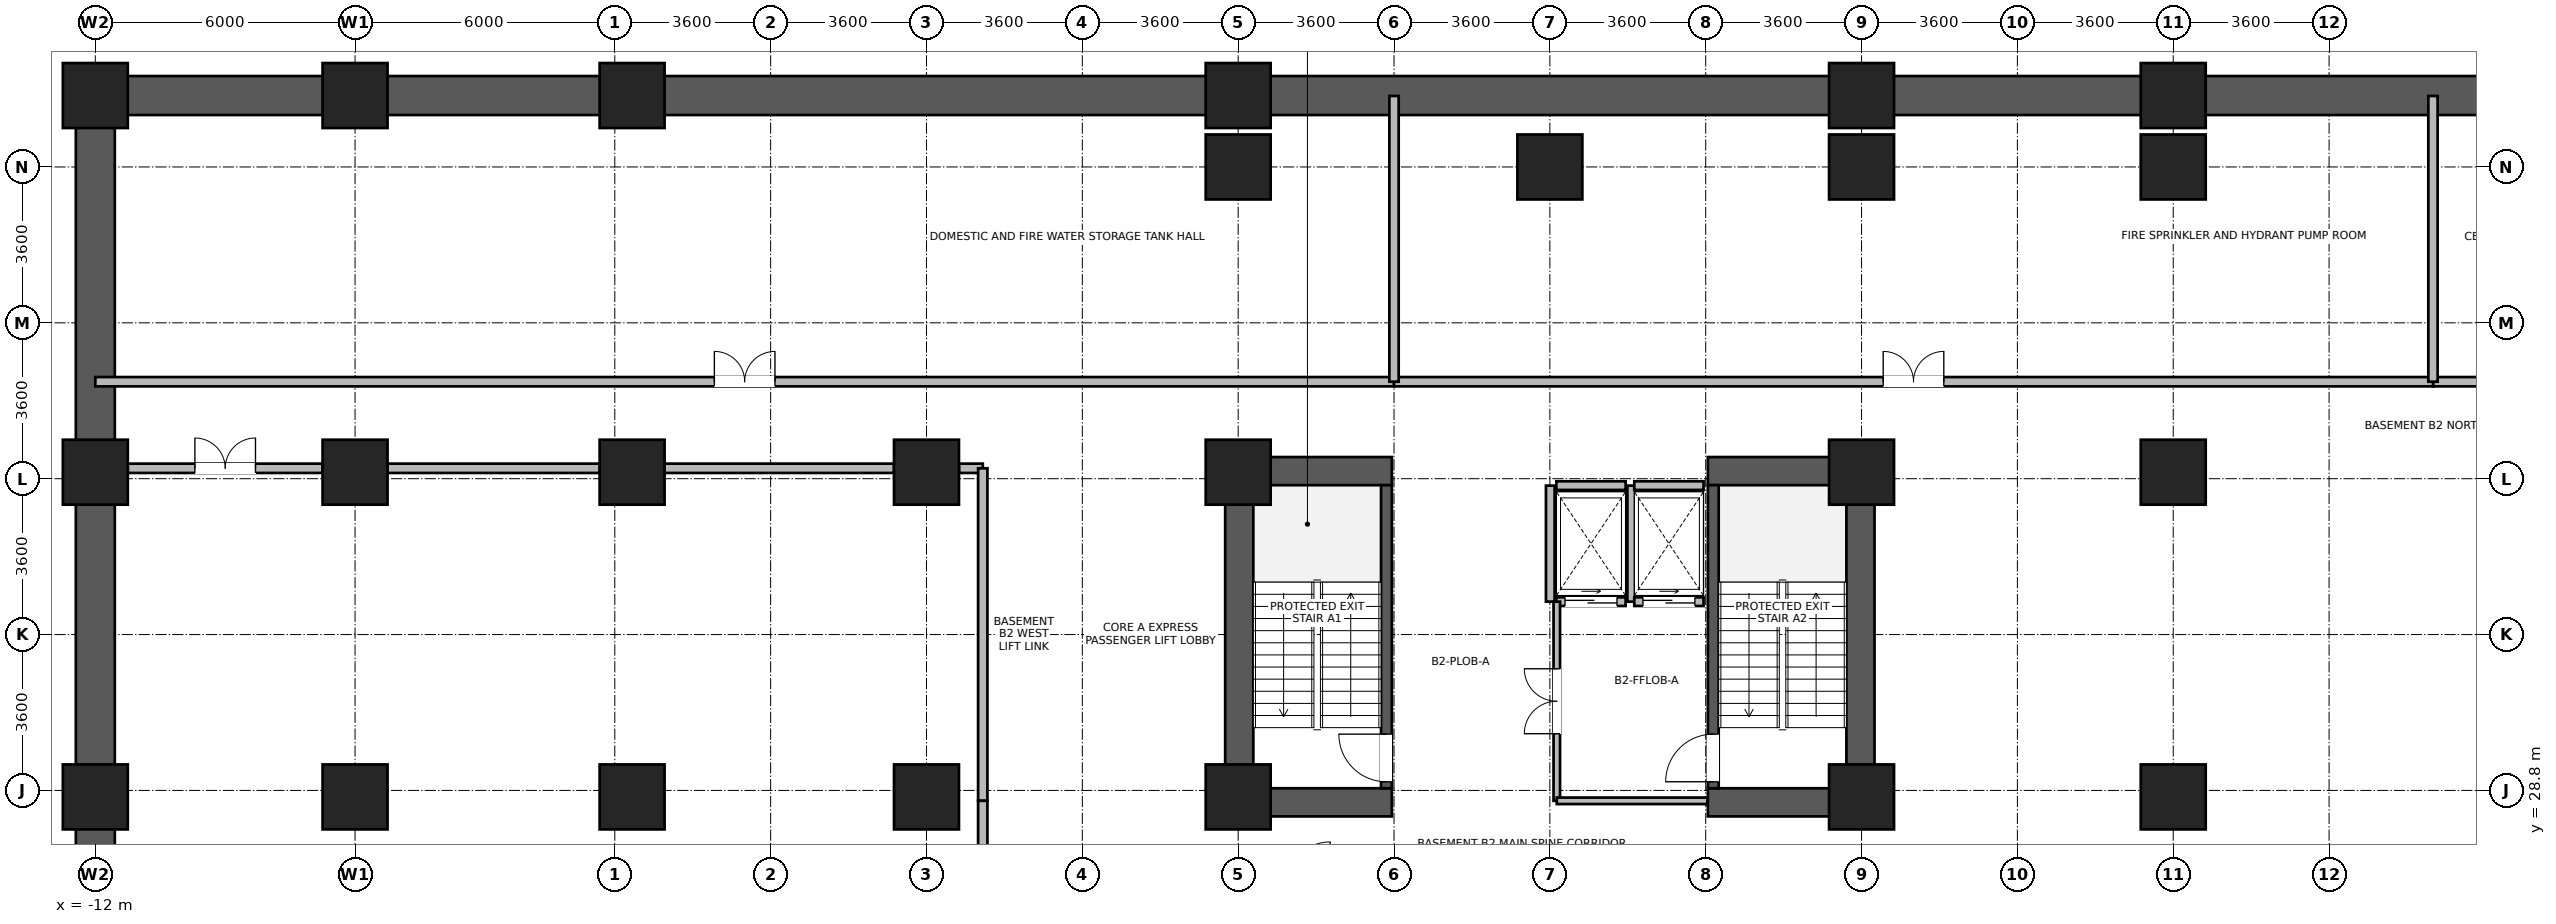
"""IFC4 building model, lengths in metres.
Left out: names, types, materials, properties, quantities, classifications, styles, units other than length and angle.
Written with IfcOpenShell. Run it as: python <this file> out.ifc"""

import sys

from ifc_helpers import new_model, si_unit, direction, frame, frame_2d, origin, origin_2d, place, context, subcontext, project, spatial, rectangle, extrude, source, transform, mapped, element, fill, save


model = new_model("IFC4")
c1 = context("Model", 3, precision=1e-05, world=origin(), true_north=direction((0.0, 1.0)))
c2 = subcontext(c1, "Body", "Model", "MODEL_VIEW")
j1 = project(units=[si_unit("LENGTHUNIT", "METRE"), si_unit("PLANEANGLEUNIT", "RADIAN")], contexts=[c1])
p1 = place(None, origin())
s1 = spatial("IfcSite", under=j1, at=p1, CompositionType="ELEMENT")
p2 = place(p1, origin())
s2 = spatial("IfcBuilding", under=s1, at=p2, CompositionType="ELEMENT")
p3 = place(p2, frame((0.0, 0.0, -9.0)))
s3 = spatial("IfcBuildingStorey", under=s2, at=p3, CompositionType="ELEMENT", Elevation=-9.0)
p4 = place(p3, frame((-12.45, 44.85, 0.0), z_axis=(0.0, 0.0, 1.0), x_axis=(1.0, 0.0, 0.0)))
e1 = element("IfcWall", 1, at=p4, inside=s3, PredefinedType="USERDEFINED", context=c2, shape_type="SweptSolid", body=[
    extrude(rectangle(XDim=86.1, YDim=0.9, at=frame_2d((43.05, 0.0))), origin(), (0.0, 0.0, 1.0), 4.18),
])
p5 = place(p3, frame((-12.0, 2.25, 0.0), z_axis=(0.0, 0.0, 1.0), x_axis=(0.0, 1.0, 0.0)))
e2 = element("IfcWall", 2, at=p5, inside=s3, PredefinedType="USERDEFINED", context=c2, shape_type="SweptSolid", body=[
    extrude(rectangle(XDim=42.15, YDim=0.9, at=frame_2d((21.075, 0.0))), origin(), (0.0, 0.0, 1.0), 4.18),
])
for number, where, z_axis, x_axis in (
    (3, (14.425, 28.2, 0.0), (0.0, 0.0, 1.0), (0.0, 1.0, 0.0)),
    (4, (28.775, 28.2, 0.0), (0.0, 0.0, 1.0), (0.0, 1.0, 0.0)),
):
    element("IfcWall", number, at=place(p3, frame(where, z_axis=z_axis, x_axis=x_axis)), inside=s3, PredefinedType="SHEAR", context=c2, shape_type="SweptSolid", body=[
        extrude(rectangle(XDim=8.3, YDim=0.65, at=frame_2d((4.15, 0.0))), origin(), (0.0, 0.0, 1.0), 4.18),
    ])
for number, where, z_axis, x_axis in (
    (5, (14.75, 28.525, 0.0), (0.0, 0.0, 1.0), (1.0, 0.0, 0.0)),
    (6, (25.25, 28.525, 0.0), (0.0, 0.0, 1.0), (1.0, 0.0, 0.0)),
    (7, (14.75, 36.175, 0.0), (0.0, 0.0, 1.0), (1.0, 0.0, 0.0)),
    (8, (25.25, 36.175, 0.0), (0.0, 0.0, 1.0), (1.0, 0.0, 0.0)),
):
    element("IfcWall", number, at=place(p3, frame(where, z_axis=z_axis, x_axis=x_axis)), inside=s3, PredefinedType="SHEAR", context=c2, shape_type="SweptSolid", body=[
        extrude(rectangle(XDim=3.2, YDim=0.65, at=frame_2d((1.6, 0.0))), origin(), (0.0, 0.0, 1.0), 4.18),
    ])
p6 = place(p3, frame((17.825, 28.85, 0.0), z_axis=(0.0, 0.0, 1.0), x_axis=(0.0, 1.0, 0.0)))
e9 = element("IfcWall", 9, at=p6, inside=s3, PredefinedType="SHEAR", context=c2, shape_type="SweptSolid", body=[
    extrude(rectangle(XDim=7.0, YDim=0.25, at=frame_2d((3.5, 0.0))), origin(), (0.0, 0.0, 1.0), 4.18),
])
p7 = place(p6, frame((0.15, 0.0, 0.0)))
e10 = element("IfcOpeningElement", 10, at=p7, cuts=e9, PredefinedType="OPENING", context=c2, shape_type="SweptSolid", body=[
    extrude(rectangle(XDim=1.1, YDim=2.08, at=frame_2d((0.55, 1.04))), frame((0.0, 0.135, 0.0), z_axis=(0.0, -1.0, 0.0), x_axis=(1.0, 0.0, 0.0)), (0.0, 0.0, 1.0), 0.27),
])
p8 = place(p3, frame((25.375, 28.85, 0.0), z_axis=(0.0, 0.0, 1.0), x_axis=(0.0, 1.0, 0.0)))
e11 = element("IfcWall", 11, at=p8, inside=s3, PredefinedType="SHEAR", context=c2, shape_type="SweptSolid", body=[
    extrude(rectangle(XDim=7.0, YDim=0.25, at=frame_2d((3.5, 0.0))), origin(), (0.0, 0.0, 1.0), 4.18),
])
p9 = place(p8, frame((0.15, 0.0, 0.0)))
e12 = element("IfcOpeningElement", 12, at=p9, cuts=e11, PredefinedType="OPENING", context=c2, shape_type="SweptSolid", body=[
    extrude(rectangle(XDim=1.1, YDim=2.08, at=frame_2d((0.55, 1.04))), frame((0.0, 0.135, 0.0), z_axis=(0.0, -1.0, 0.0), x_axis=(1.0, 0.0, 0.0)), (0.0, 0.0, 1.0), 0.27),
])
m1 = source(origin(), c2, "Body", "SweptSolid", [
    extrude(rectangle(XDim=1.5, YDim=1.5, at=origin_2d()), origin(), (0.0, 0.0, 1.0), 4.5),
])
for number, where, z_axis, x_axis in (
    (13, (7.2, 28.65, 0.0), (0.0, 0.0, 1.0), (1.0, 0.0, 0.0)),
    (14, (7.2, 36.15, 0.0), (0.0, 0.0, 1.0), (1.0, 0.0, 0.0)),
    (15, (14.4, 28.65, 0.0), (0.0, 0.0, 1.0), (1.0, 0.0, 0.0)),
    (16, (14.4, 36.15, 0.0), (0.0, 0.0, 1.0), (1.0, 0.0, 0.0)),
    (17, (14.4, 43.2, 0.0), (0.0, 0.0, 1.0), (1.0, 0.0, 0.0)),
    (18, (21.6, 43.2, 0.0), (0.0, 0.0, 1.0), (1.0, 0.0, 0.0)),
    (19, (28.8, 28.65, 0.0), (0.0, 0.0, 1.0), (1.0, 0.0, 0.0)),
    (20, (28.8, 36.15, 0.0), (0.0, 0.0, 1.0), (1.0, 0.0, 0.0)),
    (21, (28.8, 43.2, 0.0), (0.0, 0.0, 1.0), (1.0, 0.0, 0.0)),
    (22, (36.0, 43.2, 0.0), (0.0, 0.0, 1.0), (1.0, 0.0, 0.0)),
    (23, (36.0, 28.65, 0.0), (0.0, 0.0, 1.0), (1.0, 0.0, 0.0)),
    (24, (36.0, 36.15, 0.0), (0.0, 0.0, 1.0), (1.0, 0.0, 0.0)),
    (25, (0.4, 28.65, 0.0), (0.0, 0.0, 1.0), (1.0, 0.0, 0.0)),
    (26, (0.4, 36.15, 0.0), (0.0, 0.0, 1.0), (1.0, 0.0, 0.0)),
    (27, (0.4, 44.85, 0.0), (0.0, 0.0, 1.0), (1.0, 0.0, 0.0)),
    (28, (14.4, 44.85, 0.0), (0.0, 0.0, 1.0), (1.0, 0.0, 0.0)),
    (29, (28.8, 44.85, 0.0), (0.0, 0.0, 1.0), (1.0, 0.0, 0.0)),
    (30, (36.0, 44.85, 0.0), (0.0, 0.0, 1.0), (1.0, 0.0, 0.0)),
    (31, (-12.0, 28.65, 0.0), (0.0, 0.0, 1.0), (1.0, 0.0, 0.0)),
    (32, (-12.0, 36.15, 0.0), (0.0, 0.0, 1.0), (1.0, 0.0, 0.0)),
    (33, (-12.0, 44.85, 0.0), (0.0, 0.0, 1.0), (1.0, 0.0, 0.0)),
    (34, (-6.0, 28.65, 0.0), (0.0, 0.0, 1.0), (1.0, 0.0, 0.0)),
    (35, (-6.0, 36.15, 0.0), (0.0, 0.0, 1.0), (1.0, 0.0, 0.0)),
    (36, (-6.0, 44.85, 0.0), (0.0, 0.0, 1.0), (1.0, 0.0, 0.0)),
):
    element("IfcColumn", number, at=place(p3, frame(where, z_axis=z_axis, x_axis=x_axis)), inside=s3, PredefinedType="COLUMN", context=c2, shape_type="MappedRepresentation", body=[
        mapped(m1, transform((0.0, 0.0, 0.0), x_axis=(1.0, 0.0, 0.0), y_axis=(0.0, 1.0, 0.0), z_axis=(0.0, 0.0, 1.0), scale=1.0)),
    ])
p10 = place(p3, frame((21.75, 33.16, 0.0), z_axis=(0.0, 0.0, 1.0), x_axis=(1.0, 0.0, 0.0)))
e37 = element("IfcWall", 37, at=p10, inside=s3, PredefinedType="PARTITIONING", context=c2, shape_type="SweptSolid", body=[
    extrude(rectangle(XDim=1.6, YDim=0.2, at=frame_2d((0.8, 0.0))), origin(), (0.0, 0.0, 1.0), 4.16),
])
p11 = place(p10, frame((0.2, 0.0, 0.0)))
e38 = element("IfcOpeningElement", 38, at=p11, cuts=e37, PredefinedType="OPENING", context=c2, shape_type="SweptSolid", body=[
    extrude(rectangle(XDim=1.2, YDim=2.12, at=frame_2d((0.6, 1.06))), frame((0.0, 0.11, 0.0), z_axis=(0.0, -1.0, 0.0), x_axis=(1.0, 0.0, 0.0)), (0.0, 0.0, 1.0), 0.22),
])
p12 = place(p3, frame((21.75, 35.84, 0.0), z_axis=(0.0, 0.0, 1.0), x_axis=(1.0, 0.0, 0.0)))
e39 = element("IfcWall", 39, at=p12, inside=s3, PredefinedType="PARTITIONING", context=c2, shape_type="SweptSolid", body=[
    extrude(rectangle(XDim=1.6, YDim=0.2, at=frame_2d((0.8, 0.0))), origin(), (0.0, 0.0, 1.0), 2.96),
])
for number, where, z_axis, x_axis in (
    (40, (21.61, 33.16, 0.0), (0.0, 0.0, 1.0), (0.0, 1.0, 0.0)),
    (41, (23.49, 33.16, 0.0), (0.0, 0.0, 1.0), (0.0, 1.0, 0.0)),
):
    element("IfcWall", number, at=place(p3, frame(where, z_axis=z_axis, x_axis=x_axis)), inside=s3, PredefinedType="PARTITIONING", context=c2, shape_type="SweptSolid", body=[
        extrude(rectangle(XDim=2.68, YDim=0.2, at=frame_2d((1.34, 0.0))), origin(), (0.0, 0.0, 1.0), 4.16),
    ])
p13 = place(p3, frame((23.55, 33.16, 0.0), z_axis=(0.0, 0.0, 1.0), x_axis=(1.0, 0.0, 0.0)))
e42 = element("IfcWall", 42, at=p13, inside=s3, PredefinedType="PARTITIONING", context=c2, shape_type="SweptSolid", body=[
    extrude(rectangle(XDim=1.6, YDim=0.2, at=frame_2d((0.8, 0.0))), origin(), (0.0, 0.0, 1.0), 4.16),
])
p14 = place(p13, frame((0.2, 0.0, 0.0)))
e43 = element("IfcOpeningElement", 43, at=p14, cuts=e42, PredefinedType="OPENING", context=c2, shape_type="SweptSolid", body=[
    extrude(rectangle(XDim=1.2, YDim=2.12, at=frame_2d((0.6, 1.06))), frame((0.0, 0.11, 0.0), z_axis=(0.0, -1.0, 0.0), x_axis=(1.0, 0.0, 0.0)), (0.0, 0.0, 1.0), 0.22),
])
p15 = place(p3, frame((23.55, 35.84, 0.0), z_axis=(0.0, 0.0, 1.0), x_axis=(1.0, 0.0, 0.0)))
e44 = element("IfcWall", 44, at=p15, inside=s3, PredefinedType="PARTITIONING", context=c2, shape_type="SweptSolid", body=[
    extrude(rectangle(XDim=1.6, YDim=0.2, at=frame_2d((0.8, 0.0))), origin(), (0.0, 0.0, 1.0), 2.96),
])
p16 = place(p3, frame((42.0, 38.24, 0.0), z_axis=(0.0, 0.0, 1.0), x_axis=(1.0, 0.0, 0.0)))
e45 = element("IfcWall", 45, at=p16, inside=s3, PredefinedType="PARTITIONING", context=c2, shape_type="SweptSolid", body=[
    extrude(rectangle(XDim=31.2, YDim=0.215, at=frame_2d((15.6, 0.0))), origin(), (0.0, 0.0, 1.0), 4.16),
])
p17 = place(p16, frame((14.9, 0.0, 0.0)))
e46 = element("IfcOpeningElement", 46, at=p17, cuts=e45, PredefinedType="OPENING", context=c2, shape_type="SweptSolid", body=[
    extrude(rectangle(XDim=1.4, YDim=2.15, at=frame_2d((0.7, 1.075))), frame((0.0, 0.118, 0.0), z_axis=(0.0, -1.0, 0.0), x_axis=(1.0, 0.0, 0.0)), (0.0, 0.0, 1.0), 0.235),
])
p18 = place(p3, frame((-12.0, 38.24, 0.0), z_axis=(0.0, 0.0, 1.0), x_axis=(1.0, 0.0, 0.0)))
e47 = element("IfcWall", 47, at=p18, inside=s3, PredefinedType="PARTITIONING", context=c2, shape_type="SweptSolid", body=[
    extrude(rectangle(XDim=30.0, YDim=0.215, at=frame_2d((15.0, 0.0))), origin(), (0.0, 0.0, 1.0), 4.16),
])
p19 = place(p18, frame((14.3, 0.0, 0.0)))
e48 = element("IfcOpeningElement", 48, at=p19, cuts=e47, PredefinedType="OPENING", context=c2, shape_type="SweptSolid", body=[
    extrude(rectangle(XDim=1.4, YDim=2.15, at=frame_2d((0.7, 1.075))), frame((0.0, 0.118, 0.0), z_axis=(0.0, -1.0, 0.0), x_axis=(1.0, 0.0, 0.0)), (0.0, 0.0, 1.0), 0.235),
])
p20 = place(p3, frame((18.0, 38.24, 0.0), z_axis=(0.0, 0.0, 1.0), x_axis=(1.0, 0.0, 0.0)))
e49 = element("IfcWall", 49, at=p20, inside=s3, PredefinedType="PARTITIONING", context=c2, shape_type="SweptSolid", body=[
    extrude(rectangle(XDim=24.0, YDim=0.215, at=frame_2d((12.0, 0.0))), origin(), (0.0, 0.0, 1.0), 4.16),
])
p21 = place(p20, frame((11.3, 0.0, 0.0)))
e50 = element("IfcOpeningElement", 50, at=p21, cuts=e49, PredefinedType="OPENING", context=c2, shape_type="SweptSolid", body=[
    extrude(rectangle(XDim=1.4, YDim=2.15, at=frame_2d((0.7, 1.075))), frame((0.0, 0.118, 0.0), z_axis=(0.0, -1.0, 0.0), x_axis=(1.0, 0.0, 0.0)), (0.0, 0.0, 1.0), 0.235),
])
p22 = place(p3, frame((-11.25, 36.24, 0.0), z_axis=(0.0, 0.0, 1.0), x_axis=(1.0, 0.0, 0.0)))
e51 = element("IfcWall", 51, at=p22, inside=s3, PredefinedType="PARTITIONING", context=c2, shape_type="SweptSolid", body=[
    extrude(rectangle(XDim=4.5, YDim=0.215, at=frame_2d((2.25, 0.0))), origin(), (0.0, 0.0, 1.0), 3.46),
])
p23 = place(p22, frame((1.55, 0.0, 0.0)))
e52 = element("IfcOpeningElement", 52, at=p23, cuts=e51, PredefinedType="OPENING", context=c2, shape_type="SweptSolid", body=[
    extrude(rectangle(XDim=1.4, YDim=2.15, at=frame_2d((0.7, 1.075))), frame((0.0, 0.118, 0.0), z_axis=(0.0, -1.0, 0.0), x_axis=(1.0, 0.0, 0.0)), (0.0, 0.0, 1.0), 0.235),
])
p24 = place(p3, frame((-5.25, 36.24, 0.0), z_axis=(0.0, 0.0, 1.0), x_axis=(1.0, 0.0, 0.0)))
e53 = element("IfcWall", 53, at=p24, inside=s3, PredefinedType="PARTITIONING", context=c2, shape_type="SweptSolid", body=[
    extrude(rectangle(XDim=4.9, YDim=0.215, at=frame_2d((2.45, 0.0))), origin(), (0.0, 0.0, 1.0), 3.46),
])
p25 = place(p3, frame((1.15, 36.24, 0.0), z_axis=(0.0, 0.0, 1.0), x_axis=(1.0, 0.0, 0.0)))
e54 = element("IfcWall", 54, at=p25, inside=s3, PredefinedType="PARTITIONING", context=c2, shape_type="SweptSolid", body=[
    extrude(rectangle(XDim=5.3, YDim=0.215, at=frame_2d((2.65, 0.0))), origin(), (0.0, 0.0, 1.0), 3.46),
])
p26 = place(p3, frame((7.95, 36.24, 0.0), z_axis=(0.0, 0.0, 1.0), x_axis=(1.0, 0.0, 0.0)))
e55 = element("IfcWall", 55, at=p26, inside=s3, PredefinedType="PARTITIONING", context=c2, shape_type="SweptSolid", body=[
    extrude(rectangle(XDim=0.55, YDim=0.215, at=frame_2d((0.275, 0.0))), origin(), (0.0, 0.0, 1.0), 3.46),
])
p27 = place(p3, frame((8.5, 28.56, 0.0), z_axis=(0.0, 0.0, 1.0), x_axis=(0.0, 1.0, 0.0)))
e56 = element("IfcWall", 56, at=p27, inside=s3, PredefinedType="PARTITIONING", context=c2, shape_type="SweptSolid", body=[
    extrude(rectangle(XDim=7.68, YDim=0.215, at=frame_2d((3.84, 0.0))), origin(), (0.0, 0.0, 1.0), 4.16),
])
p28 = place(p3, frame((8.5, 26.56, 0.0), z_axis=(0.0, 0.0, 1.0), x_axis=(0.0, 1.0, 0.0)))
e57 = element("IfcWall", 57, at=p28, inside=s3, PredefinedType="PARTITIONING", context=c2, shape_type="SweptSolid", body=[
    extrude(rectangle(XDim=2.0, YDim=0.215, at=frame_2d((1.0, 0.0))), origin(), (0.0, 0.0, 1.0), 4.16),
])
for number, where, z_axis, x_axis in (
    (58, (18.0, 38.24, 0.0), (0.0, 0.0, 1.0), (0.0, 1.0, 0.0)),
    (59, (42.0, 38.24, 0.0), (0.0, 0.0, 1.0), (0.0, 1.0, 0.0)),
):
    element("IfcWall", number, at=place(p3, frame(where, z_axis=z_axis, x_axis=x_axis)), inside=s3, PredefinedType="PARTITIONING", context=c2, shape_type="SweptSolid", body=[
        extrude(rectangle(XDim=6.6, YDim=0.215, at=frame_2d((3.3, 0.0))), origin(), (0.0, 0.0, 1.0), 4.16),
    ])
p29 = place(p3, frame((21.76, 28.56, 0.0), z_axis=(0.0, 0.0, 1.0), x_axis=(0.0, 1.0, 0.0)))
e60 = element("IfcWall", 60, at=p29, inside=s3, PredefinedType="PARTITIONING", context=c2, shape_type="SweptSolid", body=[
    extrude(rectangle(XDim=4.6, YDim=0.15, at=frame_2d((2.3, 0.0))), origin(), (0.0, 0.0, 1.0), 4.16),
])
p30 = place(p29, frame((1.55, 0.0, 0.0)))
e61 = element("IfcOpeningElement", 61, at=p30, cuts=e60, PredefinedType="OPENING", context=c2, shape_type="SweptSolid", body=[
    extrude(rectangle(XDim=1.5, YDim=2.1, at=frame_2d((0.75, 1.05))), frame((0.0, 0.085, 0.0), z_axis=(0.0, -1.0, 0.0), x_axis=(1.0, 0.0, 0.0)), (0.0, 0.0, 1.0), 0.17),
])
p31 = place(p3, frame((21.76, 28.56, 0.0), z_axis=(0.0, 0.0, 1.0), x_axis=(1.0, 0.0, 0.0)))
e62 = element("IfcWall", 62, at=p31, inside=s3, PredefinedType="PARTITIONING", context=c2, shape_type="SweptSolid", body=[
    extrude(rectangle(XDim=3.48, YDim=0.15, at=frame_2d((1.74, 0.0))), origin(), (0.0, 0.0, 1.0), 2.96),
])
p32 = place(p7, origin())
e63 = element("IfcDoor", 63, at=p32, inside=s3, OperationType="SINGLE_SWING_RIGHT", PredefinedType="DOOR", context=c2, shape_type="SweptSolid", body=[
    extrude(rectangle(XDim=1.1, YDim=2.08, at=frame_2d((0.55, 1.04))), frame((0.0, 0.025, 0.0), z_axis=(0.0, -1.0, 0.0), x_axis=(1.0, 0.0, 0.0)), (0.0, 0.0, 1.0), 0.05),
])
fill(e10, e63)
p33 = place(p9, origin())
e64 = element("IfcDoor", 64, at=p33, inside=s3, OperationType="SINGLE_SWING_LEFT", PredefinedType="DOOR", context=c2, shape_type="SweptSolid", body=[
    extrude(rectangle(XDim=1.1, YDim=2.08, at=frame_2d((0.55, 1.04))), frame((0.0, 0.025, 0.0), z_axis=(0.0, -1.0, 0.0), x_axis=(1.0, 0.0, 0.0)), (0.0, 0.0, 1.0), 0.05),
])
fill(e12, e64)
p34 = place(p11, origin())
e65 = element("IfcDoor", 65, at=p34, inside=s3, OperationType="SLIDING_TO_RIGHT", PredefinedType="DOOR", context=c2, shape_type="SweptSolid", body=[
    extrude(rectangle(XDim=1.2, YDim=2.12, at=frame_2d((0.6, 1.06))), frame((0.0, 0.025, 0.0), z_axis=(0.0, -1.0, 0.0), x_axis=(1.0, 0.0, 0.0)), (0.0, 0.0, 1.0), 0.05),
])
fill(e38, e65)
p35 = place(p14, origin())
e66 = element("IfcDoor", 66, at=p35, inside=s3, OperationType="SLIDING_TO_RIGHT", PredefinedType="DOOR", context=c2, shape_type="SweptSolid", body=[
    extrude(rectangle(XDim=1.2, YDim=2.12, at=frame_2d((0.6, 1.06))), frame((0.0, 0.025, 0.0), z_axis=(0.0, -1.0, 0.0), x_axis=(1.0, 0.0, 0.0)), (0.0, 0.0, 1.0), 0.05),
])
fill(e43, e66)
p36 = place(p19, origin())
e67 = element("IfcDoor", 67, at=p36, inside=s3, OperationType="DOUBLE_DOOR_SINGLE_SWING", PredefinedType="DOOR", context=c2, shape_type="SweptSolid", body=[
    extrude(rectangle(XDim=1.4, YDim=2.15, at=frame_2d((0.7, 1.075))), frame((0.0, 0.025, 0.0), z_axis=(0.0, -1.0, 0.0), x_axis=(1.0, 0.0, 0.0)), (0.0, 0.0, 1.0), 0.05),
])
fill(e48, e67)
p37 = place(p21, origin())
e68 = element("IfcDoor", 68, at=p37, inside=s3, OperationType="DOUBLE_DOOR_SINGLE_SWING", PredefinedType="DOOR", context=c2, shape_type="SweptSolid", body=[
    extrude(rectangle(XDim=1.4, YDim=2.15, at=frame_2d((0.7, 1.075))), frame((0.0, 0.025, 0.0), z_axis=(0.0, -1.0, 0.0), x_axis=(1.0, 0.0, 0.0)), (0.0, 0.0, 1.0), 0.05),
])
fill(e50, e68)
p38 = place(p23, origin())
e69 = element("IfcDoor", 69, at=p38, inside=s3, OperationType="DOUBLE_DOOR_SINGLE_SWING", PredefinedType="DOOR", context=c2, shape_type="SweptSolid", body=[
    extrude(rectangle(XDim=1.4, YDim=2.15, at=frame_2d((0.7, 1.075))), frame((0.0, 0.025, 0.0), z_axis=(0.0, -1.0, 0.0), x_axis=(1.0, 0.0, 0.0)), (0.0, 0.0, 1.0), 0.05),
])
fill(e52, e69)
p39 = place(p30, origin())
e70 = element("IfcDoor", 70, at=p39, inside=s3, OperationType="DOUBLE_DOOR_SINGLE_SWING", PredefinedType="DOOR", context=c2, shape_type="SweptSolid", body=[
    extrude(rectangle(XDim=1.5, YDim=2.1, at=frame_2d((0.75, 1.05))), frame((0.0, 0.025, 0.0), z_axis=(0.0, -1.0, 0.0), x_axis=(1.0, 0.0, 0.0)), (0.0, 0.0, 1.0), 0.05),
])
fill(e61, e70)
save(model, sys.argv[1])
